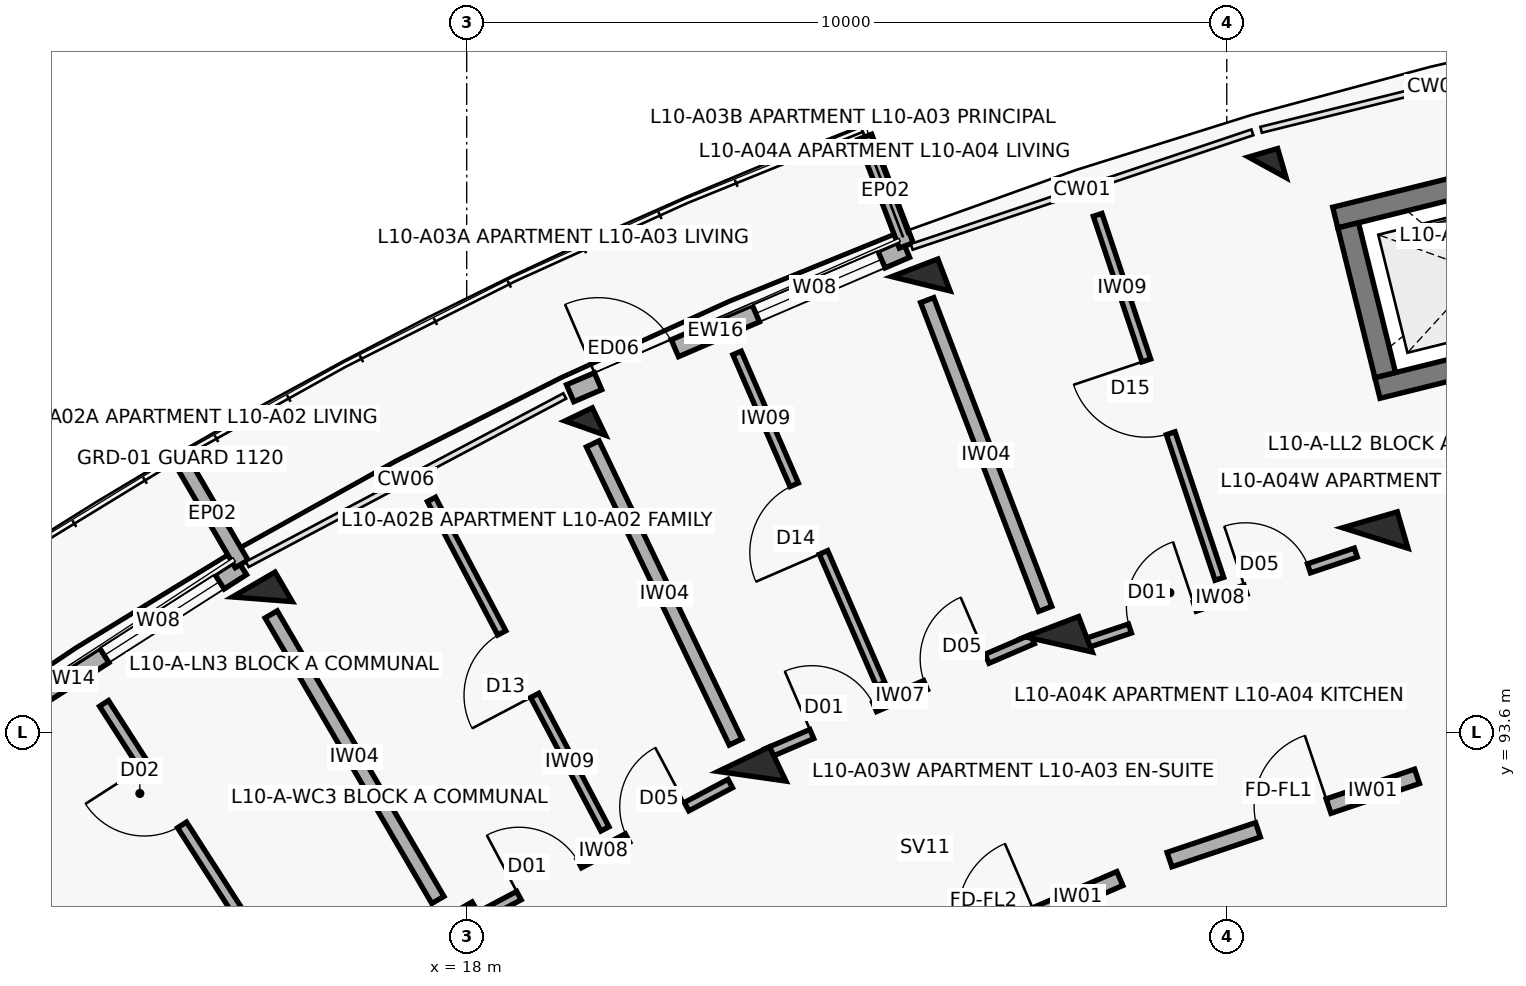
"""IFC4 building model, lengths in metres.
Left out: names, types, materials, properties, quantities, classifications, styles, units other than length and angle.
Written with IfcOpenShell. Run it as: python <this file> out.ifc"""

import sys

from ifc_helpers import new_model, si_unit, direction, frame, frame_2d, origin, origin_2d, place, context, subcontext, project, spatial, rectangle, extrude, element, fill, save


model = new_model("IFC4")
c1 = context("Model", 3, precision=1e-05, world=origin(), true_north=direction((0.0, 1.0)))
c2 = subcontext(c1, "Body", "Model", "MODEL_VIEW")
j1 = project(units=[si_unit("LENGTHUNIT", "METRE"), si_unit("PLANEANGLEUNIT", "RADIAN")], contexts=[c1])
p1 = place(None, origin())
s1 = spatial("IfcSite", under=j1, at=p1, CompositionType="ELEMENT")
p2 = place(p1, origin())
s2 = spatial("IfcBuilding", under=s1, at=p2, CompositionType="ELEMENT")
p3 = place(p2, frame((0.0, 0.0, 32.9)))
s3 = spatial("IfcBuildingStorey", under=s2, at=p3, CompositionType="ELEMENT", Elevation=32.9)
p4 = place(p3, frame((17.873, 90.96, 0.0), z_axis=(0.0, 0.0, 1.0), x_axis=(-0.504226211181, 0.863571611366, 0.0)))
e1 = element("IfcColumn", 1, at=p4, inside=s3, PredefinedType="COLUMN", context=c2, shape_type="SweptSolid", body=[
    extrude(rectangle(XDim=0.5, YDim=0.75, at=origin_2d()), origin(), (0.0, 0.0, 1.0), 3.1),
])
p5 = place(p3, frame((15.311, 95.347, 0.0), z_axis=(0.0, 0.0, 1.0), x_axis=(-0.504226211181, 0.863571611366, 0.0)))
e2 = element("IfcColumn", 2, at=p5, inside=s3, PredefinedType="COLUMN", context=c2, shape_type="SweptSolid", body=[
    extrude(rectangle(XDim=0.45, YDim=0.65, at=origin_2d()), origin(), (0.0, 0.0, 1.0), 3.1),
])
p6 = place(p3, frame((21.754, 93.019, 0.0), z_axis=(0.0, 0.0, 1.0), x_axis=(-0.432085748802, 0.901832526405, 0.0)))
e3 = element("IfcColumn", 3, at=p6, inside=s3, PredefinedType="COLUMN", context=c2, shape_type="SweptSolid", body=[
    extrude(rectangle(XDim=0.5, YDim=0.75, at=origin_2d()), origin(), (0.0, 0.0, 1.0), 3.1),
])
p7 = place(p3, frame((19.559, 97.6, 0.0), z_axis=(0.0, 0.0, 1.0), x_axis=(-0.432085748802, 0.901832526405, 0.0)))
e4 = element("IfcColumn", 4, at=p7, inside=s3, PredefinedType="COLUMN", context=c2, shape_type="SweptSolid", body=[
    extrude(rectangle(XDim=0.4, YDim=0.4, at=origin_2d()), origin(), (0.0, 0.0, 1.0), 3.1),
])
p8 = place(p3, frame((25.79, 94.753, 0.0), z_axis=(0.0, 0.0, 1.0), x_axis=(-0.357064076459, 0.934079892355, 0.0)))
e5 = element("IfcColumn", 5, at=p8, inside=s3, PredefinedType="COLUMN", context=c2, shape_type="SweptSolid", body=[
    extrude(rectangle(XDim=0.5, YDim=0.75, at=origin_2d()), origin(), (0.0, 0.0, 1.0), 3.1),
])
p9 = place(p3, frame((23.976, 99.499, 0.0), z_axis=(0.0, 0.0, 1.0), x_axis=(-0.357064076459, 0.934079892355, 0.0)))
e6 = element("IfcColumn", 6, at=p9, inside=s3, PredefinedType="COLUMN", context=c2, shape_type="SweptSolid", body=[
    extrude(rectangle(XDim=0.45, YDim=0.65, at=origin_2d()), origin(), (0.0, 0.0, 1.0), 3.1),
])
p10 = place(p3, frame((29.954, 96.153, 0.0), z_axis=(0.0, 0.0, 1.0), x_axis=(-0.27966144946, 0.96009867914, 0.0)))
e7 = element("IfcColumn", 7, at=p10, inside=s3, PredefinedType="COLUMN", context=c2, shape_type="SweptSolid", body=[
    extrude(rectangle(XDim=0.5, YDim=0.75, at=origin_2d()), origin(), (0.0, 0.0, 1.0), 3.1),
])
p11 = place(p3, frame((28.533, 101.031, 0.0), z_axis=(0.0, 0.0, 1.0), x_axis=(-0.27966144946, 0.96009867914, 0.0)))
e8 = element("IfcColumn", 8, at=p11, inside=s3, PredefinedType="COLUMN", context=c2, shape_type="SweptSolid", body=[
    extrude(rectangle(XDim=0.4, YDim=0.4, at=origin_2d()), origin(), (0.0, 0.0, 1.0), 3.1),
])
p12 = place(p3, frame((10.992, 93.176, 0.0), z_axis=(0.0, 0.0, 1.0), x_axis=(0.84226218024, 0.539068103061, 0.0)))
e9 = element("IfcWall", 9, at=p12, inside=s3, PredefinedType="SOLIDWALL", context=c2, shape_type="SweptSolid", body=[
    extrude(rectangle(XDim=4.809, YDim=0.228, at=frame_2d((2.404, 0.0))), origin(), (0.0, 0.0, 1.0), 2.25),
])
p13 = place(p12, frame((0.4, 0.0, 0.0)))
e10 = element("IfcOpeningElement", 10, at=p13, cuts=e9, PredefinedType="OPENING", context=c2, shape_type="SweptSolid", body=[
    extrude(rectangle(XDim=1.1, YDim=2.15, at=frame_2d((0.55, 1.075))), frame((0.0, 0.124, 0.0), z_axis=(0.0, -1.0, 0.0), x_axis=(1.0, 0.0, 0.0)), (0.0, 0.0, 1.0), 0.248),
])
p14 = place(p12, frame((2.659, 0.0, 0.35)))
e11 = element("IfcOpeningElement", 11, at=p14, cuts=e9, PredefinedType="OPENING", context=c2, shape_type="SweptSolid", body=[
    extrude(rectangle(XDim=1.8, YDim=1.65, at=frame_2d((0.9, 0.825))), frame((0.0, 0.124, 0.0), z_axis=(0.0, -1.0, 0.0), x_axis=(1.0, 0.0, 0.0)), (0.0, 0.0, 1.0), 0.248),
])
p15 = place(p3, frame((15.039, 95.813, 0.0), z_axis=(0.0, 0.0, 1.0), x_axis=(-0.504228145431, 0.863570481985, 0.0)))
e12 = element("IfcWall", 12, at=p15, inside=s3, PredefinedType="PARAPET", context=c2, shape_type="SweptSolid", body=[
    extrude(rectangle(XDim=1.53, YDim=0.195, at=frame_2d((0.765, 0.0))), origin(), (0.0, 0.0, 1.0), 2.25),
])
p16 = place(p3, frame((19.361, 98.059, 0.0), z_axis=(0.0, 0.0, 1.0), x_axis=(0.918711189033, 0.394930058548, 0.0)))
e13 = element("IfcWall", 13, at=p16, inside=s3, PredefinedType="SOLIDWALL", context=c2, shape_type="SweptSolid", body=[
    extrude(rectangle(XDim=4.809, YDim=0.242, at=frame_2d((2.404, 0.0))), origin(), (0.0, 0.0, 1.0), 2.25),
])
p17 = place(p16, frame((0.4, 0.0, 0.0)))
e14 = element("IfcOpeningElement", 14, at=p17, cuts=e13, PredefinedType="OPENING", context=c2, shape_type="SweptSolid", body=[
    extrude(rectangle(XDim=1.1, YDim=2.15, at=frame_2d((0.55, 1.075))), frame((0.0, 0.131, 0.0), z_axis=(0.0, -1.0, 0.0), x_axis=(1.0, 0.0, 0.0)), (0.0, 0.0, 1.0), 0.262),
])
p18 = place(p16, frame((2.659, 0.0, 0.35)))
e15 = element("IfcOpeningElement", 15, at=p18, cuts=e13, PredefinedType="OPENING", context=c2, shape_type="SweptSolid", body=[
    extrude(rectangle(XDim=1.8, YDim=1.65, at=frame_2d((0.9, 0.825))), frame((0.0, 0.131, 0.0), z_axis=(0.0, -1.0, 0.0), x_axis=(1.0, 0.0, 0.0)), (0.0, 0.0, 1.0), 0.262),
])
p19 = place(p3, frame((23.783, 100.003, 0.0), z_axis=(0.0, 0.0, 1.0), x_axis=(-0.356957296461, 0.934120703391, 0.0)))
e16 = element("IfcWall", 16, at=p19, inside=s3, PredefinedType="PARAPET", context=c2, shape_type="SweptSolid", body=[
    extrude(rectangle(XDim=1.53, YDim=0.195, at=frame_2d((0.765, 0.0))), origin(), (0.0, 0.0, 1.0), 2.25),
])
p20 = place(p3, frame((33.273, 98.942, 0.0), z_axis=(0.0, 0.0, 1.0), x_axis=(-0.970707542441, -0.240264160972, 0.0)))
e17 = element("IfcWall", 17, at=p20, inside=s3, PredefinedType="SHEAR", context=c2, shape_type="SweptSolid", body=[
    extrude(rectangle(XDim=3.39, YDim=0.28, at=frame_2d((1.695, 0.0))), origin(), (0.0, 0.0, 1.0), 3.1),
])
p21 = place(p20, frame((1.095, 0.0, 0.0)))
e18 = element("IfcOpeningElement", 18, at=p21, cuts=e17, PredefinedType="OPENING", context=c2, shape_type="SweptSolid", body=[
    extrude(rectangle(XDim=1.2, YDim=2.15, at=frame_2d((0.6, 1.075))), frame((0.0, 0.15, 0.0), z_axis=(0.0, -1.0, 0.0), x_axis=(1.0, 0.0, 0.0)), (0.0, 0.0, 1.0), 0.3),
])
p22 = place(p3, frame((32.718, 101.185, 0.0), z_axis=(0.0, 0.0, 1.0), x_axis=(-0.970711699588, -0.240247364777, 0.0)))
e19 = element("IfcWall", 19, at=p22, inside=s3, PredefinedType="SHEAR", context=c2, shape_type="SweptSolid", body=[
    extrude(rectangle(XDim=3.39, YDim=0.28, at=frame_2d((1.695, 0.0))), origin(), (0.0, 0.0, 1.0), 3.1),
])
p23 = place(p3, frame((30.085, 98.297, 0.0), z_axis=(0.0, 0.0, 1.0), x_axis=(-0.2402993748, 0.970698825832, 0.0)))
e20 = element("IfcWall", 20, at=p23, inside=s3, PredefinedType="SHEAR", context=c2, shape_type="SweptSolid", body=[
    extrude(rectangle(XDim=2.03, YDim=0.28, at=frame_2d((1.015, 0.0))), origin(), (0.0, 0.0, 1.0), 3.1),
])
p24 = place(p3, frame((17.524, 87.288, 0.0), z_axis=(0.0, 0.0, 1.0), x_axis=(-0.540338452216, 0.841447774408, 0.0)))
e21 = element("IfcWall", 21, at=p24, inside=s3, PredefinedType="PARTITIONING", context=c2, shape_type="SweptSolid", body=[
    extrude(rectangle(XDim=7.95, YDim=0.14, at=frame_2d((3.975, 0.0))), origin(), (0.0, 0.0, 1.0), 2.08),
])
p25 = place(p24, frame((6.05, 0.0, 0.0)))
e22 = element("IfcOpeningElement", 22, at=p25, cuts=e21, PredefinedType="OPENING", context=c2, shape_type="SweptSolid", body=[
    extrude(rectangle(XDim=0.92, YDim=2.1, at=frame_2d((0.46, 1.05))), frame((0.0, 0.08, 0.0), z_axis=(0.0, -1.0, 0.0), x_axis=(1.0, 0.0, 0.0)), (0.0, 0.0, 1.0), 0.16),
])
p26 = place(p3, frame((18.113, 91.144, 0.0), z_axis=(0.0, 0.0, 1.0), x_axis=(0.88341855112, 0.46858474531, 0.0)))
e23 = element("IfcWall", 23, at=p26, inside=s3, PredefinedType="PARTITIONING", context=c2, shape_type="SweptSolid", body=[
    extrude(rectangle(XDim=3.797, YDim=0.125, at=frame_2d((1.898, 0.0))), origin(), (0.0, 0.0, 1.0), 2.08),
])
p27 = place(p26, frame((0.65, 0.0, 0.0)))
e24 = element("IfcOpeningElement", 24, at=p27, cuts=e23, PredefinedType="OPENING", context=c2, shape_type="SweptSolid", body=[
    extrude(rectangle(XDim=0.9, YDim=2.1, at=frame_2d((0.45, 1.05))), frame((0.0, 0.073, 0.0), z_axis=(0.0, -1.0, 0.0), x_axis=(1.0, 0.0, 0.0)), (0.0, 0.0, 1.0), 0.145),
])
p28 = place(p26, frame((2.267, 0.0, 0.0)))
e25 = element("IfcOpeningElement", 25, at=p28, cuts=e23, PredefinedType="OPENING", context=c2, shape_type="SweptSolid", body=[
    extrude(rectangle(XDim=0.88, YDim=2.1, at=frame_2d((0.44, 1.05))), frame((0.0, 0.073, 0.0), z_axis=(0.0, -1.0, 0.0), x_axis=(1.0, 0.0, 0.0)), (0.0, 0.0, 1.0), 0.145),
])
p29 = place(p3, frame((19.819, 92.326, 0.0), z_axis=(0.0, 0.0, 1.0), x_axis=(-0.465849102717, 0.884864177995, 0.0)))
e26 = element("IfcWall", 26, at=p29, inside=s3, PredefinedType="PARTITIONING", context=c2, shape_type="SweptSolid", body=[
    extrude(rectangle(XDim=4.9, YDim=0.12, at=frame_2d((2.45, 0.0))), origin(), (0.0, 0.0, 1.0), 2.08),
])
p30 = place(p29, frame((1.985, 0.0, 0.0)))
e27 = element("IfcOpeningElement", 27, at=p30, cuts=e26, PredefinedType="OPENING", context=c2, shape_type="SweptSolid", body=[
    extrude(rectangle(XDim=0.93, YDim=2.1, at=frame_2d((0.465, 1.05))), frame((0.0, 0.07, 0.0), z_axis=(0.0, -1.0, 0.0), x_axis=(1.0, 0.0, 0.0)), (0.0, 0.0, 1.0), 0.14),
])
p31 = place(p3, frame((17.621, 91.392, 0.0), z_axis=(0.0, 0.0, 1.0), x_axis=(-0.504216452091, 0.863577309475, 0.0)))
e28 = element("IfcWall", 28, at=p31, inside=s3, PredefinedType="SOLIDWALL", context=c2, shape_type="SweptSolid", body=[
    extrude(rectangle(XDim=4.35, YDim=0.185, at=frame_2d((2.175, 0.0))), origin(), (0.0, 0.0, 1.0), 2.08),
])
p32 = place(p3, frame((23.437, 90.316, 0.0), z_axis=(0.0, 0.0, 1.0), x_axis=(0.918718172399, 0.394913813008, 0.0)))
e29 = element("IfcWall", 29, at=p32, inside=s3, PredefinedType="SOLIDWALL", context=c2, shape_type="SweptSolid", body=[
    extrude(rectangle(XDim=3.436, YDim=0.2, at=frame_2d((1.718, 0.0))), origin(), (0.0, 0.0, 1.0), 2.08),
])
p33 = place(p32, frame((1.208, 0.0, 0.0)))
e30 = element("IfcOpeningElement", 30, at=p33, cuts=e29, PredefinedType="OPENING", context=c2, shape_type="SweptSolid", body=[
    extrude(rectangle(XDim=1.02, YDim=2.15, at=frame_2d((0.51, 1.075))), frame((0.0, 0.11, 0.0), z_axis=(0.0, -1.0, 0.0), x_axis=(1.0, 0.0, 0.0)), (0.0, 0.0, 1.0), 0.22),
])
p34 = place(p3, frame((21.943, 93.317, 0.0), z_axis=(0.0, 0.0, 1.0), x_axis=(0.918726854017, 0.394893615684, 0.0)))
e31 = element("IfcWall", 31, at=p34, inside=s3, PredefinedType="PARTITIONING", context=c2, shape_type="SweptSolid", body=[
    extrude(rectangle(XDim=3.81, YDim=0.13, at=frame_2d((1.905, 0.0))), origin(), (0.0, 0.0, 1.0), 2.08),
])
p35 = place(p34, frame((0.65, 0.0, 0.0)))
e32 = element("IfcOpeningElement", 32, at=p35, cuts=e31, PredefinedType="OPENING", context=c2, shape_type="SweptSolid", body=[
    extrude(rectangle(XDim=0.9, YDim=2.1, at=frame_2d((0.45, 1.05))), frame((0.0, 0.075, 0.0), z_axis=(0.0, -1.0, 0.0), x_axis=(1.0, 0.0, 0.0)), (0.0, 0.0, 1.0), 0.15),
])
p36 = place(p34, frame((2.28, 0.0, 0.0)))
e33 = element("IfcOpeningElement", 33, at=p36, cuts=e31, PredefinedType="OPENING", context=c2, shape_type="SweptSolid", body=[
    extrude(rectangle(XDim=0.88, YDim=2.1, at=frame_2d((0.44, 1.05))), frame((0.0, 0.075, 0.0), z_axis=(0.0, -1.0, 0.0), x_axis=(1.0, 0.0, 0.0)), (0.0, 0.0, 1.0), 0.15),
])
p37 = place(p3, frame((23.446, 94.23, 0.0), z_axis=(0.0, 0.0, 1.0), x_axis=(-0.3976752315, 0.917526244993, 0.0)))
e34 = element("IfcWall", 34, at=p37, inside=s3, PredefinedType="PARTITIONING", context=c2, shape_type="SweptSolid", body=[
    extrude(rectangle(XDim=4.75, YDim=0.12, at=frame_2d((2.375, 0.0))), origin(), (0.0, 0.0, 1.0), 2.08),
])
p38 = place(p37, frame((1.89, 0.0, 0.0)))
e35 = element("IfcOpeningElement", 35, at=p38, cuts=e34, PredefinedType="OPENING", context=c2, shape_type="SweptSolid", body=[
    extrude(rectangle(XDim=0.97, YDim=2.1, at=frame_2d((0.485, 1.05))), frame((0.0, 0.07, 0.0), z_axis=(0.0, -1.0, 0.0), x_axis=(1.0, 0.0, 0.0)), (0.0, 0.0, 1.0), 0.14),
])
p39 = place(p3, frame((21.538, 93.469, 0.0), z_axis=(0.0, 0.0, 1.0), x_axis=(-0.432086898897, 0.901831975371, 0.0)))
e36 = element("IfcWall", 36, at=p39, inside=s3, PredefinedType="SOLIDWALL", context=c2, shape_type="SweptSolid", body=[
    extrude(rectangle(XDim=4.35, YDim=0.185, at=frame_2d((2.175, 0.0))), origin(), (0.0, 0.0, 1.0), 2.08),
])
p40 = place(p3, frame((27.247, 91.923, 0.0), z_axis=(0.0, 0.0, 1.0), x_axis=(0.947863007629, 0.318678080151, 0.0)))
e37 = element("IfcWall", 37, at=p40, inside=s3, PredefinedType="SOLIDWALL", context=c2, shape_type="SweptSolid", body=[
    extrude(rectangle(XDim=3.436, YDim=0.2, at=frame_2d((1.718, 0.0))), origin(), (0.0, 0.0, 1.0), 2.08),
])
p41 = place(p40, frame((1.228, 0.0, 0.0)))
e38 = element("IfcOpeningElement", 38, at=p41, cuts=e37, PredefinedType="OPENING", context=c2, shape_type="SweptSolid", body=[
    extrude(rectangle(XDim=0.98, YDim=2.15, at=frame_2d((0.49, 1.075))), frame((0.0, 0.11, 0.0), z_axis=(0.0, -1.0, 0.0), x_axis=(1.0, 0.0, 0.0)), (0.0, 0.0, 1.0), 0.22),
])
p42 = place(p3, frame((26.11, 94.756, 0.0), z_axis=(0.0, 0.0, 1.0), x_axis=(0.947873924847, 0.318645606584, 0.0)))
e39 = element("IfcWall", 39, at=p42, inside=s3, PredefinedType="PARTITIONING", context=c2, shape_type="SweptSolid", body=[
    extrude(rectangle(XDim=3.785, YDim=0.125, at=frame_2d((1.893, 0.0))), origin(), (0.0, 0.0, 1.0), 2.08),
])
p43 = place(p42, frame((0.65, 0.0, 0.0)))
e40 = element("IfcOpeningElement", 40, at=p43, cuts=e39, PredefinedType="OPENING", context=c2, shape_type="SweptSolid", body=[
    extrude(rectangle(XDim=0.9, YDim=2.1, at=frame_2d((0.45, 1.05))), frame((0.0, 0.073, 0.0), z_axis=(0.0, -1.0, 0.0), x_axis=(1.0, 0.0, 0.0)), (0.0, 0.0, 1.0), 0.145),
])
p44 = place(p42, frame((2.255, 0.0, 0.0)))
e41 = element("IfcOpeningElement", 41, at=p44, cuts=e39, PredefinedType="OPENING", context=c2, shape_type="SweptSolid", body=[
    extrude(rectangle(XDim=0.88, YDim=2.1, at=frame_2d((0.44, 1.05))), frame((0.0, 0.073, 0.0), z_axis=(0.0, -1.0, 0.0), x_axis=(1.0, 0.0, 0.0)), (0.0, 0.0, 1.0), 0.145),
])
p45 = place(p3, frame((27.903, 95.616, 0.0), z_axis=(0.0, 0.0, 1.0), x_axis=(-0.31722829501, 0.948349201953, 0.0)))
e42 = element("IfcWall", 42, at=p45, inside=s3, PredefinedType="PARTITIONING", context=c2, shape_type="SweptSolid", body=[
    extrude(rectangle(XDim=5.05, YDim=0.12, at=frame_2d((2.525, 0.0))), origin(), (0.0, 0.0, 1.0), 2.08),
])
p46 = place(p45, frame((2.02, 0.0, 0.0)))
e43 = element("IfcOpeningElement", 43, at=p46, cuts=e42, PredefinedType="OPENING", context=c2, shape_type="SweptSolid", body=[
    extrude(rectangle(XDim=1.01, YDim=2.1, at=frame_2d((0.505, 1.05))), frame((0.0, 0.07, 0.0), z_axis=(0.0, -1.0, 0.0), x_axis=(1.0, 0.0, 0.0)), (0.0, 0.0, 1.0), 0.14),
])
p47 = place(p3, frame((25.611, 95.22, 0.0), z_axis=(0.0, 0.0, 1.0), x_axis=(-0.357064016205, 0.934079915388, 0.0)))
e44 = element("IfcWall", 44, at=p47, inside=s3, PredefinedType="SOLIDWALL", context=c2, shape_type="SweptSolid", body=[
    extrude(rectangle(XDim=4.35, YDim=0.185, at=frame_2d((2.175, 0.0))), origin(), (0.0, 0.0, 1.0), 2.08),
])
p48 = place(p14, origin())
e45 = element("IfcWindow", 45, at=p48, inside=s3, PartitioningType="TRIPLE_PANEL_VERTICAL", PredefinedType="WINDOW", context=c2, shape_type="SweptSolid", body=[
    extrude(rectangle(XDim=1.8, YDim=1.65, at=frame_2d((0.9, 0.825))), frame((0.0, 0.03, 0.0), z_axis=(0.0, -1.0, 0.0), x_axis=(1.0, 0.0, 0.0)), (0.0, 0.0, 1.0), 0.06),
])
fill(e11, e45)
p49 = place(p17, origin())
e46 = element("IfcDoor", 46, at=p49, inside=s3, OperationType="SINGLE_SWING_LEFT", PredefinedType="DOOR", context=c2, shape_type="SweptSolid", body=[
    extrude(rectangle(XDim=1.1, YDim=2.15, at=frame_2d((0.55, 1.075))), frame((0.0, 0.025, 0.0), z_axis=(0.0, -1.0, 0.0), x_axis=(1.0, 0.0, 0.0)), (0.0, 0.0, 1.0), 0.05),
])
fill(e14, e46)
p50 = place(p18, origin())
e47 = element("IfcWindow", 47, at=p50, inside=s3, PartitioningType="TRIPLE_PANEL_VERTICAL", PredefinedType="WINDOW", context=c2, shape_type="SweptSolid", body=[
    extrude(rectangle(XDim=1.8, YDim=1.65, at=frame_2d((0.9, 0.825))), frame((0.0, 0.03, 0.0), z_axis=(0.0, -1.0, 0.0), x_axis=(1.0, 0.0, 0.0)), (0.0, 0.0, 1.0), 0.06),
])
fill(e15, e47)
p51 = place(p25, origin())
e48 = element("IfcDoor", 48, at=p51, inside=s3, OperationType="SINGLE_SWING_RIGHT", PredefinedType="DOOR", context=c2, shape_type="SweptSolid", body=[
    extrude(rectangle(XDim=0.92, YDim=2.1, at=frame_2d((0.46, 1.05))), frame((0.0, 0.025, 0.0), z_axis=(0.0, -1.0, 0.0), x_axis=(1.0, 0.0, 0.0)), (0.0, 0.0, 1.0), 0.05),
])
fill(e22, e48)
p52 = place(p27, origin())
e49 = element("IfcDoor", 49, at=p52, inside=s3, OperationType="SINGLE_SWING_LEFT", PredefinedType="DOOR", context=c2, shape_type="SweptSolid", body=[
    extrude(rectangle(XDim=0.9, YDim=2.1, at=frame_2d((0.45, 1.05))), frame((0.0, 0.025, 0.0), z_axis=(0.0, -1.0, 0.0), x_axis=(1.0, 0.0, 0.0)), (0.0, 0.0, 1.0), 0.05),
])
fill(e24, e49)
p53 = place(p28, origin())
e50 = element("IfcDoor", 50, at=p53, inside=s3, OperationType="SINGLE_SWING_RIGHT", PredefinedType="DOOR", context=c2, shape_type="SweptSolid", body=[
    extrude(rectangle(XDim=0.88, YDim=2.1, at=frame_2d((0.44, 1.05))), frame((0.0, 0.025, 0.0), z_axis=(0.0, -1.0, 0.0), x_axis=(1.0, 0.0, 0.0)), (0.0, 0.0, 1.0), 0.05),
])
fill(e25, e50)
p54 = place(p30, origin())
e51 = element("IfcDoor", 51, at=p54, inside=s3, OperationType="SINGLE_SWING_LEFT", PredefinedType="DOOR", context=c2, shape_type="SweptSolid", body=[
    extrude(rectangle(XDim=0.93, YDim=2.1, at=frame_2d((0.465, 1.05))), frame((0.0, 0.025, 0.0), z_axis=(0.0, -1.0, 0.0), x_axis=(1.0, 0.0, 0.0)), (0.0, 0.0, 1.0), 0.05),
])
fill(e27, e51)
p55 = place(p35, origin())
e52 = element("IfcDoor", 52, at=p55, inside=s3, OperationType="SINGLE_SWING_LEFT", PredefinedType="DOOR", context=c2, shape_type="SweptSolid", body=[
    extrude(rectangle(XDim=0.9, YDim=2.1, at=frame_2d((0.45, 1.05))), frame((0.0, 0.025, 0.0), z_axis=(0.0, -1.0, 0.0), x_axis=(1.0, 0.0, 0.0)), (0.0, 0.0, 1.0), 0.05),
])
fill(e32, e52)
p56 = place(p36, origin())
e53 = element("IfcDoor", 53, at=p56, inside=s3, OperationType="SINGLE_SWING_RIGHT", PredefinedType="DOOR", context=c2, shape_type="SweptSolid", body=[
    extrude(rectangle(XDim=0.88, YDim=2.1, at=frame_2d((0.44, 1.05))), frame((0.0, 0.025, 0.0), z_axis=(0.0, -1.0, 0.0), x_axis=(1.0, 0.0, 0.0)), (0.0, 0.0, 1.0), 0.05),
])
fill(e33, e53)
p57 = place(p38, origin())
e54 = element("IfcDoor", 54, at=p57, inside=s3, OperationType="SINGLE_SWING_LEFT", PredefinedType="DOOR", context=c2, shape_type="SweptSolid", body=[
    extrude(rectangle(XDim=0.97, YDim=2.1, at=frame_2d((0.485, 1.05))), frame((0.0, 0.025, 0.0), z_axis=(0.0, -1.0, 0.0), x_axis=(1.0, 0.0, 0.0)), (0.0, 0.0, 1.0), 0.05),
])
fill(e35, e54)
p58 = place(p41, origin())
e55 = element("IfcDoor", 55, at=p58, inside=s3, OperationType="SINGLE_SWING_RIGHT", PredefinedType="DOOR", context=c2, shape_type="SweptSolid", body=[
    extrude(rectangle(XDim=0.98, YDim=2.15, at=frame_2d((0.49, 1.075))), frame((0.0, 0.025, 0.0), z_axis=(0.0, -1.0, 0.0), x_axis=(1.0, 0.0, 0.0)), (0.0, 0.0, 1.0), 0.05),
])
fill(e38, e55)
p59 = place(p43, origin())
e56 = element("IfcDoor", 56, at=p59, inside=s3, OperationType="SINGLE_SWING_RIGHT", PredefinedType="DOOR", context=c2, shape_type="SweptSolid", body=[
    extrude(rectangle(XDim=0.9, YDim=2.1, at=frame_2d((0.45, 1.05))), frame((0.0, 0.025, 0.0), z_axis=(0.0, -1.0, 0.0), x_axis=(1.0, 0.0, 0.0)), (0.0, 0.0, 1.0), 0.05),
])
fill(e40, e56)
p60 = place(p44, origin())
e57 = element("IfcDoor", 57, at=p60, inside=s3, OperationType="SINGLE_SWING_LEFT", PredefinedType="DOOR", context=c2, shape_type="SweptSolid", body=[
    extrude(rectangle(XDim=0.88, YDim=2.1, at=frame_2d((0.44, 1.05))), frame((0.0, 0.025, 0.0), z_axis=(0.0, -1.0, 0.0), x_axis=(1.0, 0.0, 0.0)), (0.0, 0.0, 1.0), 0.05),
])
fill(e41, e57)
p61 = place(p46, origin())
e58 = element("IfcDoor", 58, at=p61, inside=s3, OperationType="SINGLE_SWING_RIGHT", PredefinedType="DOOR", context=c2, shape_type="SweptSolid", body=[
    extrude(rectangle(XDim=1.01, YDim=2.1, at=frame_2d((0.505, 1.05))), frame((0.0, 0.025, 0.0), z_axis=(0.0, -1.0, 0.0), x_axis=(1.0, 0.0, 0.0)), (0.0, 0.0, 1.0), 0.05),
])
fill(e43, e58)
save(model, sys.argv[1])
